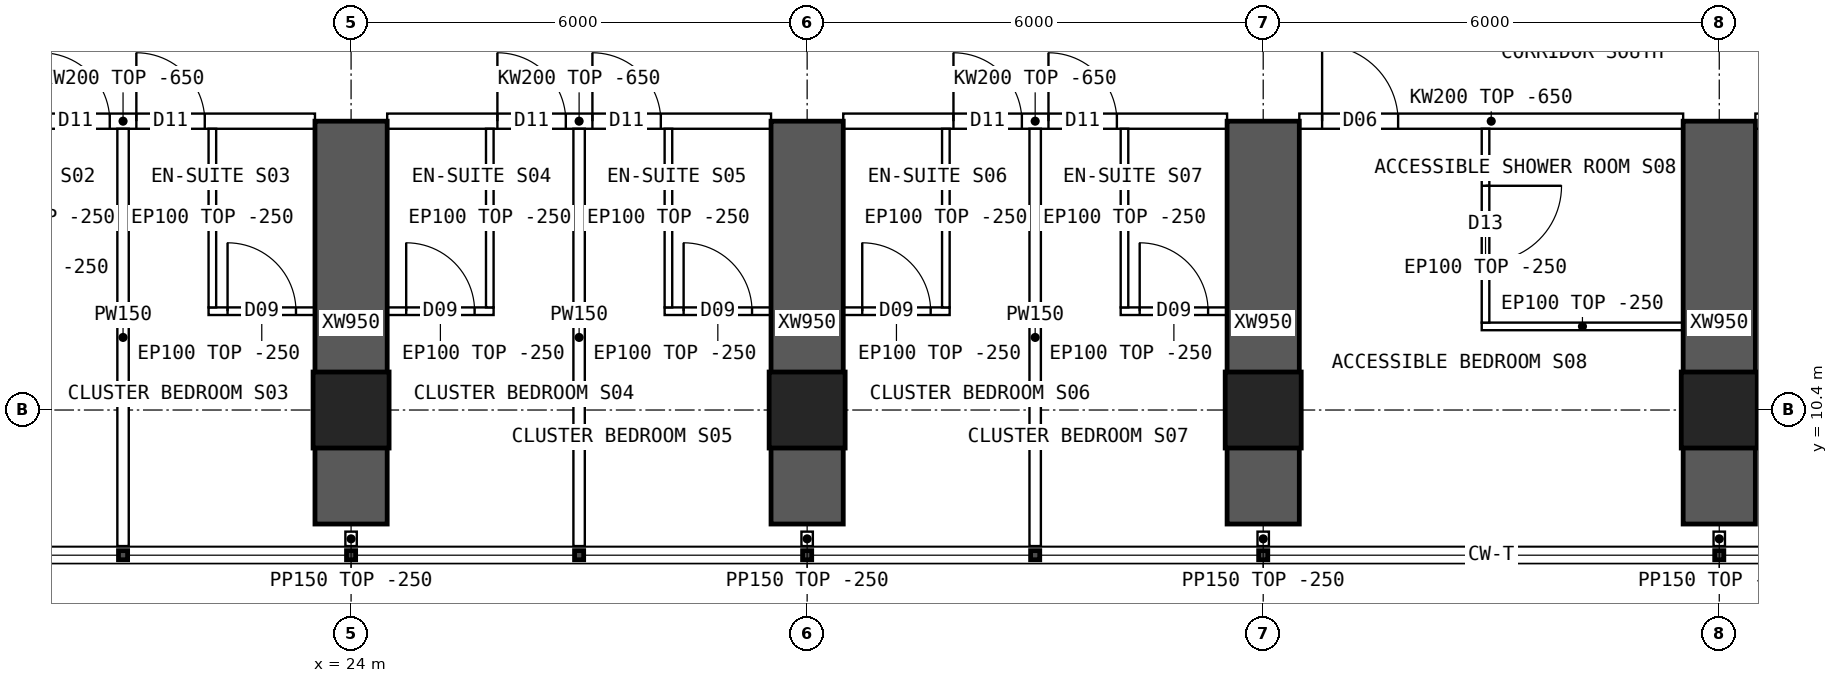
"""IFC4 building model, lengths in metres.
Left out: names, types, materials, properties, quantities, classifications, styles, units other than length and angle.
Written with IfcOpenShell. Run it as: python <this file> out.ifc"""

import sys

from ifc_helpers import new_model, si_unit, direction, frame, frame_2d, origin, origin_2d, place, context, subcontext, project, spatial, polyline, rectangle, hollow_rectangle, outline, extrude, element, fill, save


model = new_model("IFC4")
c1 = context("Model", 3, precision=1e-05, world=origin(), true_north=direction((0.0, 1.0)))
c2 = subcontext(c1, "Body", "Model", "MODEL_VIEW")
j1 = project(units=[si_unit("LENGTHUNIT", "METRE"), si_unit("PLANEANGLEUNIT", "RADIAN")], contexts=[c1])
p1 = place(None, origin())
s1 = spatial("IfcSite", under=j1, at=p1, CompositionType="ELEMENT")
p2 = place(p1, origin())
s2 = spatial("IfcBuilding", under=s1, at=p2, CompositionType="ELEMENT")
p3 = place(p2, frame((0.0, 0.0, 84.4)))
s3 = spatial("IfcBuildingStorey", under=s2, at=p3, CompositionType="ELEMENT", Elevation=84.4)
for number, where, z_axis, x_axis in (
    (1, (24.0, 10.4, 0.0), (0.0, 0.0, 1.0), (1.0, 0.0, 0.0)),
    (2, (30.0, 10.4, 0.0), (0.0, 0.0, 1.0), (1.0, 0.0, 0.0)),
    (3, (36.0, 10.4, 0.0), (0.0, 0.0, 1.0), (1.0, 0.0, 0.0)),
    (4, (42.0, 10.4, 0.0), (0.0, 0.0, 1.0), (1.0, 0.0, 0.0)),
):
    element("IfcColumn", number, at=place(p3, frame(where, z_axis=z_axis, x_axis=x_axis)), inside=s3, PredefinedType="COLUMN", context=c2, shape_type="SweptSolid", body=[
        extrude(hollow_rectangle(XDim=1.0, YDim=1.0, WallThickness=0.1, at=origin_2d()), origin(), (0.0, 0.0, 1.0), 3.75),
    ])
for number, where, z_axis, x_axis in (
    (5, (24.0, 8.9, 0.0), (0.0, 0.0, 1.0), (0.0, 1.0, 0.0)),
    (6, (30.0, 8.9, 0.0), (0.0, 0.0, 1.0), (0.0, 1.0, 0.0)),
    (7, (36.0, 8.9, 0.0), (0.0, 0.0, 1.0), (0.0, 1.0, 0.0)),
    (8, (42.0, 8.9, 0.0), (0.0, 0.0, 1.0), (0.0, 1.0, 0.0)),
):
    element("IfcWall", number, at=place(p3, frame(where, z_axis=z_axis, x_axis=x_axis)), inside=s3, PredefinedType="SHEAR", context=c2, shape_type="SweptSolid", body=[
        extrude(rectangle(XDim=5.3, YDim=0.95, at=frame_2d((2.65, 0.0))), origin(), (0.0, 0.0, 1.0), 3.75),
    ])
p4 = place(p3, frame((18.475, 14.2, 0.0), z_axis=(0.0, 0.0, 1.0), x_axis=(1.0, 0.0, 0.0)))
e9 = element("IfcWall", 9, at=p4, inside=s3, PredefinedType="SOLIDWALL", context=c2, shape_type="SweptSolid", body=[
    extrude(outline(polyline([(0.0, 0.0), (5.05, 0.0), (5.05, 3.1), (0.0, 3.1), (0.0, 0.0)])), frame((0.0, 0.1, 0.0), z_axis=(0.0, -1.0, 0.0), x_axis=(1.0, 0.0, 0.0)), (0.0, 0.0, 1.0), 0.2),
])
p5 = place(p4, frame((1.45, 0.0, 0.0)))
e10 = element("IfcOpeningElement", 10, at=p5, cuts=e9, PredefinedType="OPENING", context=c2, shape_type="SweptSolid", body=[
    extrude(rectangle(XDim=0.9, YDim=2.1, at=frame_2d((0.45, 1.05))), frame((0.0, 0.11, 0.0), z_axis=(0.0, -1.0, 0.0), x_axis=(1.0, 0.0, 0.0)), (0.0, 0.0, 1.0), 0.22),
])
p6 = place(p4, frame((2.7, 0.0, 0.0)))
e11 = element("IfcOpeningElement", 11, at=p6, cuts=e9, PredefinedType="OPENING", context=c2, shape_type="SweptSolid", body=[
    extrude(rectangle(XDim=0.9, YDim=2.1, at=frame_2d((0.45, 1.05))), frame((0.0, 0.11, 0.0), z_axis=(0.0, -1.0, 0.0), x_axis=(1.0, 0.0, 0.0)), (0.0, 0.0, 1.0), 0.22),
])
p7 = place(p3, frame((24.475, 14.2, 0.0), z_axis=(0.0, 0.0, 1.0), x_axis=(1.0, 0.0, 0.0)))
e12 = element("IfcWall", 12, at=p7, inside=s3, PredefinedType="SOLIDWALL", context=c2, shape_type="SweptSolid", body=[
    extrude(outline(polyline([(0.0, 0.0), (5.05, 0.0), (5.05, 3.1), (0.0, 3.1), (0.0, 0.0)])), frame((0.0, 0.1, 0.0), z_axis=(0.0, -1.0, 0.0), x_axis=(1.0, 0.0, 0.0)), (0.0, 0.0, 1.0), 0.2),
])
p8 = place(p7, frame((1.45, 0.0, 0.0)))
e13 = element("IfcOpeningElement", 13, at=p8, cuts=e12, PredefinedType="OPENING", context=c2, shape_type="SweptSolid", body=[
    extrude(rectangle(XDim=0.9, YDim=2.1, at=frame_2d((0.45, 1.05))), frame((0.0, 0.11, 0.0), z_axis=(0.0, -1.0, 0.0), x_axis=(1.0, 0.0, 0.0)), (0.0, 0.0, 1.0), 0.22),
])
p9 = place(p7, frame((2.7, 0.0, 0.0)))
e14 = element("IfcOpeningElement", 14, at=p9, cuts=e12, PredefinedType="OPENING", context=c2, shape_type="SweptSolid", body=[
    extrude(rectangle(XDim=0.9, YDim=2.1, at=frame_2d((0.45, 1.05))), frame((0.0, 0.11, 0.0), z_axis=(0.0, -1.0, 0.0), x_axis=(1.0, 0.0, 0.0)), (0.0, 0.0, 1.0), 0.22),
])
p10 = place(p3, frame((30.475, 14.2, 0.0), z_axis=(0.0, 0.0, 1.0), x_axis=(1.0, 0.0, 0.0)))
e15 = element("IfcWall", 15, at=p10, inside=s3, PredefinedType="SOLIDWALL", context=c2, shape_type="SweptSolid", body=[
    extrude(outline(polyline([(0.0, 0.0), (5.05, 0.0), (5.05, 3.1), (0.0, 3.1), (0.0, 0.0)])), frame((0.0, 0.1, 0.0), z_axis=(0.0, -1.0, 0.0), x_axis=(1.0, 0.0, 0.0)), (0.0, 0.0, 1.0), 0.2),
])
p11 = place(p10, frame((1.45, 0.0, 0.0)))
e16 = element("IfcOpeningElement", 16, at=p11, cuts=e15, PredefinedType="OPENING", context=c2, shape_type="SweptSolid", body=[
    extrude(rectangle(XDim=0.9, YDim=2.1, at=frame_2d((0.45, 1.05))), frame((0.0, 0.11, 0.0), z_axis=(0.0, -1.0, 0.0), x_axis=(1.0, 0.0, 0.0)), (0.0, 0.0, 1.0), 0.22),
])
p12 = place(p10, frame((2.7, 0.0, 0.0)))
e17 = element("IfcOpeningElement", 17, at=p12, cuts=e15, PredefinedType="OPENING", context=c2, shape_type="SweptSolid", body=[
    extrude(rectangle(XDim=0.9, YDim=2.1, at=frame_2d((0.45, 1.05))), frame((0.0, 0.11, 0.0), z_axis=(0.0, -1.0, 0.0), x_axis=(1.0, 0.0, 0.0)), (0.0, 0.0, 1.0), 0.22),
])
p13 = place(p3, frame((36.475, 14.2, 0.0), z_axis=(0.0, 0.0, 1.0), x_axis=(1.0, 0.0, 0.0)))
e18 = element("IfcWall", 18, at=p13, inside=s3, PredefinedType="SOLIDWALL", context=c2, shape_type="SweptSolid", body=[
    extrude(outline(polyline([(0.0, 0.0), (5.05, 0.0), (5.05, 3.1), (0.0, 3.1), (0.0, 0.0)])), frame((0.0, 0.1, 0.0), z_axis=(0.0, -1.0, 0.0), x_axis=(1.0, 0.0, 0.0)), (0.0, 0.0, 1.0), 0.2),
])
p14 = place(p13, frame((0.3, 0.0, 0.0)))
e19 = element("IfcOpeningElement", 19, at=p14, cuts=e18, PredefinedType="OPENING", context=c2, shape_type="SweptSolid", body=[
    extrude(rectangle(XDim=1.0, YDim=2.1, at=frame_2d((0.5, 1.05))), frame((0.0, 0.11, 0.0), z_axis=(0.0, -1.0, 0.0), x_axis=(1.0, 0.0, 0.0)), (0.0, 0.0, 1.0), 0.22),
])
p15 = place(p3, frame((42.475, 14.2, 0.0), z_axis=(0.0, 0.0, 1.0), x_axis=(1.0, 0.0, 0.0)))
e20 = element("IfcWall", 20, at=p15, inside=s3, PredefinedType="SOLIDWALL", context=c2, shape_type="SweptSolid", body=[
    extrude(outline(polyline([(0.0, 0.0), (5.05, 0.0), (5.05, 3.1), (0.0, 3.1), (0.0, 0.0)])), frame((0.0, 0.1, 0.0), z_axis=(0.0, -1.0, 0.0), x_axis=(1.0, 0.0, 0.0)), (0.0, 0.0, 1.0), 0.2),
])
p16 = place(p15, frame((0.6, 0.0, 0.0)))
e21 = element("IfcOpeningElement", 21, at=p16, cuts=e20, PredefinedType="OPENING", context=c2, shape_type="SweptSolid", body=[
    extrude(rectangle(XDim=1.0, YDim=2.1, at=frame_2d((0.5, 1.05))), frame((0.0, 0.11, 0.0), z_axis=(0.0, -1.0, 0.0), x_axis=(1.0, 0.0, 0.0)), (0.0, 0.0, 1.0), 0.22),
])
p17 = place(p3, frame((21.0, 8.61, 0.0), z_axis=(0.0, 0.0, 1.0), x_axis=(0.0, 1.0, 0.0)))
e22 = element("IfcWall", 22, at=p17, inside=s3, PredefinedType="PARTITIONING", context=c2, shape_type="SweptSolid", body=[
    extrude(outline(polyline([(0.0, 0.0), (5.49, 0.0), (5.49, 3.1), (5.442, 3.1), (5.44, 3.5), (1.992, 3.5), (1.99, 3.1), (1.592, 3.1), (1.59, 3.5), (0.0, 3.5), (0.0, 0.0)])), frame((0.0, 0.075, 0.0), z_axis=(0.0, -1.0, 0.0), x_axis=(1.0, 0.0, 0.0)), (0.0, 0.0, 1.0), 0.15),
])
p18 = place(p3, frame((23.525, 11.7, 0.0), z_axis=(0.0, 0.0, 1.0), x_axis=(-1.0, 0.0, 0.0)))
e23 = element("IfcWall", 23, at=p18, inside=s3, PredefinedType="PARTITIONING", context=c2, shape_type="SweptSolid", body=[
    extrude(rectangle(XDim=1.4, YDim=0.1, at=frame_2d((0.7, 0.0))), origin(), (0.0, 0.0, 1.0), 3.5),
])
p19 = place(p18, frame((0.25, 0.0, 0.0)))
e24 = element("IfcOpeningElement", 24, at=p19, cuts=e23, PredefinedType="OPENING", context=c2, shape_type="SweptSolid", body=[
    extrude(rectangle(XDim=0.9, YDim=2.1, at=frame_2d((0.45, 1.05))), frame((0.0, 0.06, 0.0), z_axis=(0.0, -1.0, 0.0), x_axis=(1.0, 0.0, 0.0)), (0.0, 0.0, 1.0), 0.12),
])
p20 = place(p3, frame((22.175, 11.75, 0.0), z_axis=(0.0, 0.0, 1.0), x_axis=(0.0, 1.0, 0.0)))
e25 = element("IfcWall", 25, at=p20, inside=s3, PredefinedType="PARTITIONING", context=c2, shape_type="SweptSolid", body=[
    extrude(outline(polyline([(0.0, 0.0), (2.35, 0.0), (2.35, 3.1), (2.302, 3.1), (2.3, 3.5), (0.0, 3.5), (0.0, 0.0)])), frame((0.0, 0.05, 0.0), z_axis=(0.0, -1.0, 0.0), x_axis=(1.0, 0.0, 0.0)), (0.0, 0.0, 1.0), 0.1),
])
p21 = place(p3, frame((27.0, 8.61, 0.0), z_axis=(0.0, 0.0, 1.0), x_axis=(0.0, 1.0, 0.0)))
e26 = element("IfcWall", 26, at=p21, inside=s3, PredefinedType="PARTITIONING", context=c2, shape_type="SweptSolid", body=[
    extrude(outline(polyline([(0.0, 0.0), (5.49, 0.0), (5.49, 3.1), (5.442, 3.1), (5.44, 3.5), (1.992, 3.5), (1.99, 3.1), (1.592, 3.1), (1.59, 3.5), (0.0, 3.5), (0.0, 0.0)])), frame((0.0, 0.075, 0.0), z_axis=(0.0, -1.0, 0.0), x_axis=(1.0, 0.0, 0.0)), (0.0, 0.0, 1.0), 0.15),
])
p22 = place(p3, frame((25.875, 11.7, 0.0), z_axis=(0.0, 0.0, 1.0), x_axis=(-1.0, 0.0, 0.0)))
e27 = element("IfcWall", 27, at=p22, inside=s3, PredefinedType="PARTITIONING", context=c2, shape_type="SweptSolid", body=[
    extrude(rectangle(XDim=1.4, YDim=0.1, at=frame_2d((0.7, 0.0))), origin(), (0.0, 0.0, 1.0), 3.5),
])
p23 = place(p22, frame((0.25, 0.0, 0.0)))
e28 = element("IfcOpeningElement", 28, at=p23, cuts=e27, PredefinedType="OPENING", context=c2, shape_type="SweptSolid", body=[
    extrude(rectangle(XDim=0.9, YDim=2.1, at=frame_2d((0.45, 1.05))), frame((0.0, 0.06, 0.0), z_axis=(0.0, -1.0, 0.0), x_axis=(1.0, 0.0, 0.0)), (0.0, 0.0, 1.0), 0.12),
])
p24 = place(p3, frame((25.825, 11.75, 0.0), z_axis=(0.0, 0.0, 1.0), x_axis=(0.0, 1.0, 0.0)))
e29 = element("IfcWall", 29, at=p24, inside=s3, PredefinedType="PARTITIONING", context=c2, shape_type="SweptSolid", body=[
    extrude(outline(polyline([(0.0, 0.0), (2.35, 0.0), (2.35, 3.1), (2.302, 3.1), (2.3, 3.5), (0.0, 3.5), (0.0, 0.0)])), frame((0.0, 0.05, 0.0), z_axis=(0.0, -1.0, 0.0), x_axis=(1.0, 0.0, 0.0)), (0.0, 0.0, 1.0), 0.1),
])
p25 = place(p3, frame((29.525, 11.7, 0.0), z_axis=(0.0, 0.0, 1.0), x_axis=(-1.0, 0.0, 0.0)))
e30 = element("IfcWall", 30, at=p25, inside=s3, PredefinedType="PARTITIONING", context=c2, shape_type="SweptSolid", body=[
    extrude(rectangle(XDim=1.4, YDim=0.1, at=frame_2d((0.7, 0.0))), origin(), (0.0, 0.0, 1.0), 3.5),
])
p26 = place(p25, frame((0.25, 0.0, 0.0)))
e31 = element("IfcOpeningElement", 31, at=p26, cuts=e30, PredefinedType="OPENING", context=c2, shape_type="SweptSolid", body=[
    extrude(rectangle(XDim=0.9, YDim=2.1, at=frame_2d((0.45, 1.05))), frame((0.0, 0.06, 0.0), z_axis=(0.0, -1.0, 0.0), x_axis=(1.0, 0.0, 0.0)), (0.0, 0.0, 1.0), 0.12),
])
p27 = place(p3, frame((28.175, 11.75, 0.0), z_axis=(0.0, 0.0, 1.0), x_axis=(0.0, 1.0, 0.0)))
e32 = element("IfcWall", 32, at=p27, inside=s3, PredefinedType="PARTITIONING", context=c2, shape_type="SweptSolid", body=[
    extrude(outline(polyline([(0.0, 0.0), (2.35, 0.0), (2.35, 3.1), (2.302, 3.1), (2.3, 3.5), (0.0, 3.5), (0.0, 0.0)])), frame((0.0, 0.05, 0.0), z_axis=(0.0, -1.0, 0.0), x_axis=(1.0, 0.0, 0.0)), (0.0, 0.0, 1.0), 0.1),
])
p28 = place(p3, frame((33.0, 8.61, 0.0), z_axis=(0.0, 0.0, 1.0), x_axis=(0.0, 1.0, 0.0)))
e33 = element("IfcWall", 33, at=p28, inside=s3, PredefinedType="PARTITIONING", context=c2, shape_type="SweptSolid", body=[
    extrude(outline(polyline([(0.0, 0.0), (5.49, 0.0), (5.49, 3.1), (5.442, 3.1), (5.44, 3.5), (1.992, 3.5), (1.99, 3.1), (1.592, 3.1), (1.59, 3.5), (0.0, 3.5), (0.0, 0.0)])), frame((0.0, 0.075, 0.0), z_axis=(0.0, -1.0, 0.0), x_axis=(1.0, 0.0, 0.0)), (0.0, 0.0, 1.0), 0.15),
])
p29 = place(p3, frame((31.875, 11.7, 0.0), z_axis=(0.0, 0.0, 1.0), x_axis=(-1.0, 0.0, 0.0)))
e34 = element("IfcWall", 34, at=p29, inside=s3, PredefinedType="PARTITIONING", context=c2, shape_type="SweptSolid", body=[
    extrude(rectangle(XDim=1.4, YDim=0.1, at=frame_2d((0.7, 0.0))), origin(), (0.0, 0.0, 1.0), 3.5),
])
p30 = place(p29, frame((0.25, 0.0, 0.0)))
e35 = element("IfcOpeningElement", 35, at=p30, cuts=e34, PredefinedType="OPENING", context=c2, shape_type="SweptSolid", body=[
    extrude(rectangle(XDim=0.9, YDim=2.1, at=frame_2d((0.45, 1.05))), frame((0.0, 0.06, 0.0), z_axis=(0.0, -1.0, 0.0), x_axis=(1.0, 0.0, 0.0)), (0.0, 0.0, 1.0), 0.12),
])
p31 = place(p3, frame((31.825, 11.75, 0.0), z_axis=(0.0, 0.0, 1.0), x_axis=(0.0, 1.0, 0.0)))
e36 = element("IfcWall", 36, at=p31, inside=s3, PredefinedType="PARTITIONING", context=c2, shape_type="SweptSolid", body=[
    extrude(outline(polyline([(0.0, 0.0), (2.35, 0.0), (2.35, 3.1), (2.302, 3.1), (2.3, 3.5), (0.0, 3.5), (0.0, 0.0)])), frame((0.0, 0.05, 0.0), z_axis=(0.0, -1.0, 0.0), x_axis=(1.0, 0.0, 0.0)), (0.0, 0.0, 1.0), 0.1),
])
p32 = place(p3, frame((35.525, 11.7, 0.0), z_axis=(0.0, 0.0, 1.0), x_axis=(-1.0, 0.0, 0.0)))
e37 = element("IfcWall", 37, at=p32, inside=s3, PredefinedType="PARTITIONING", context=c2, shape_type="SweptSolid", body=[
    extrude(rectangle(XDim=1.4, YDim=0.1, at=frame_2d((0.7, 0.0))), origin(), (0.0, 0.0, 1.0), 3.5),
])
p33 = place(p32, frame((0.25, 0.0, 0.0)))
e38 = element("IfcOpeningElement", 38, at=p33, cuts=e37, PredefinedType="OPENING", context=c2, shape_type="SweptSolid", body=[
    extrude(rectangle(XDim=0.9, YDim=2.1, at=frame_2d((0.45, 1.05))), frame((0.0, 0.06, 0.0), z_axis=(0.0, -1.0, 0.0), x_axis=(1.0, 0.0, 0.0)), (0.0, 0.0, 1.0), 0.12),
])
p34 = place(p3, frame((34.175, 11.75, 0.0), z_axis=(0.0, 0.0, 1.0), x_axis=(0.0, 1.0, 0.0)))
e39 = element("IfcWall", 39, at=p34, inside=s3, PredefinedType="PARTITIONING", context=c2, shape_type="SweptSolid", body=[
    extrude(outline(polyline([(0.0, 0.0), (2.35, 0.0), (2.35, 3.1), (2.302, 3.1), (2.3, 3.5), (0.0, 3.5), (0.0, 0.0)])), frame((0.0, 0.05, 0.0), z_axis=(0.0, -1.0, 0.0), x_axis=(1.0, 0.0, 0.0)), (0.0, 0.0, 1.0), 0.1),
])
p35 = place(p3, frame((38.875, 11.5, 0.0), z_axis=(0.0, 0.0, 1.0), x_axis=(1.0, 0.0, 0.0)))
e40 = element("IfcWall", 40, at=p35, inside=s3, PredefinedType="PARTITIONING", context=c2, shape_type="SweptSolid", body=[
    extrude(rectangle(XDim=2.65, YDim=0.1, at=frame_2d((1.325, 0.0))), origin(), (0.0, 0.0, 1.0), 3.5),
])
p36 = place(p3, frame((38.925, 11.55, 0.0), z_axis=(0.0, 0.0, 1.0), x_axis=(0.0, 1.0, 0.0)))
e41 = element("IfcWall", 41, at=p36, inside=s3, PredefinedType="PARTITIONING", context=c2, shape_type="SweptSolid", body=[
    extrude(outline(polyline([(0.0, 0.0), (2.55, 0.0), (2.55, 3.1), (2.502, 3.1), (2.5, 3.5), (0.0, 3.5), (0.0, 0.0)])), frame((0.0, 0.05, 0.0), z_axis=(0.0, -1.0, 0.0), x_axis=(1.0, 0.0, 0.0)), (0.0, 0.0, 1.0), 0.1),
])
p37 = place(p36, frame((0.8, 0.0, 0.0)))
e42 = element("IfcOpeningElement", 42, at=p37, cuts=e41, PredefinedType="OPENING", context=c2, shape_type="SweptSolid", body=[
    extrude(rectangle(XDim=1.0, YDim=2.1, at=frame_2d((0.5, 1.05))), frame((0.0, 0.06, 0.0), z_axis=(0.0, -1.0, 0.0), x_axis=(1.0, 0.0, 0.0)), (0.0, 0.0, 1.0), 0.12),
])
for number, where, z_axis, x_axis in (
    (43, (24.0, 8.8, 0.0), (0.0, 0.0, 1.0), (0.0, -1.0, 0.0)),
    (44, (30.0, 8.8, 0.0), (0.0, 0.0, 1.0), (0.0, -1.0, 0.0)),
    (45, (36.0, 8.8, 0.0), (0.0, 0.0, 1.0), (0.0, -1.0, 0.0)),
    (46, (42.0, 8.8, 0.0), (0.0, 0.0, 1.0), (0.0, -1.0, 0.0)),
):
    element("IfcWall", number, at=place(p3, frame(where, z_axis=z_axis, x_axis=x_axis)), inside=s3, PredefinedType="PARTITIONING", context=c2, shape_type="SweptSolid", body=[
        extrude(rectangle(XDim=0.19, YDim=0.15, at=frame_2d((0.095, 0.0))), origin(), (0.0, 0.0, 1.0), 3.5),
    ])
p38 = place(p5, origin())
e47 = element("IfcDoor", 47, at=p38, inside=s3, OperationType="SINGLE_SWING_LEFT", PredefinedType="DOOR", context=c2, shape_type="SweptSolid", body=[
    extrude(rectangle(XDim=0.9, YDim=2.1, at=frame_2d((0.45, 1.05))), frame((0.0, 0.025, 0.0), z_axis=(0.0, -1.0, 0.0), x_axis=(1.0, 0.0, 0.0)), (0.0, 0.0, 1.0), 0.05),
])
fill(e10, e47)
p39 = place(p19, origin())
e48 = element("IfcDoor", 48, at=p39, inside=s3, OperationType="SINGLE_SWING_RIGHT", PredefinedType="DOOR", context=c2, shape_type="SweptSolid", body=[
    extrude(rectangle(XDim=0.9, YDim=2.1, at=frame_2d((0.45, 1.05))), frame((0.0, 0.025, 0.0), z_axis=(0.0, -1.0, 0.0), x_axis=(1.0, 0.0, 0.0)), (0.0, 0.0, 1.0), 0.05),
])
fill(e24, e48)
p40 = place(p6, origin())
e49 = element("IfcDoor", 49, at=p40, inside=s3, OperationType="SINGLE_SWING_LEFT", PredefinedType="DOOR", context=c2, shape_type="SweptSolid", body=[
    extrude(rectangle(XDim=0.9, YDim=2.1, at=frame_2d((0.45, 1.05))), frame((0.0, 0.025, 0.0), z_axis=(0.0, -1.0, 0.0), x_axis=(1.0, 0.0, 0.0)), (0.0, 0.0, 1.0), 0.05),
])
fill(e11, e49)
p41 = place(p23, origin())
e50 = element("IfcDoor", 50, at=p41, inside=s3, OperationType="SINGLE_SWING_RIGHT", PredefinedType="DOOR", context=c2, shape_type="SweptSolid", body=[
    extrude(rectangle(XDim=0.9, YDim=2.1, at=frame_2d((0.45, 1.05))), frame((0.0, 0.025, 0.0), z_axis=(0.0, -1.0, 0.0), x_axis=(1.0, 0.0, 0.0)), (0.0, 0.0, 1.0), 0.05),
])
fill(e28, e50)
p42 = place(p8, origin())
e51 = element("IfcDoor", 51, at=p42, inside=s3, OperationType="SINGLE_SWING_LEFT", PredefinedType="DOOR", context=c2, shape_type="SweptSolid", body=[
    extrude(rectangle(XDim=0.9, YDim=2.1, at=frame_2d((0.45, 1.05))), frame((0.0, 0.025, 0.0), z_axis=(0.0, -1.0, 0.0), x_axis=(1.0, 0.0, 0.0)), (0.0, 0.0, 1.0), 0.05),
])
fill(e13, e51)
p43 = place(p26, origin())
e52 = element("IfcDoor", 52, at=p43, inside=s3, OperationType="SINGLE_SWING_RIGHT", PredefinedType="DOOR", context=c2, shape_type="SweptSolid", body=[
    extrude(rectangle(XDim=0.9, YDim=2.1, at=frame_2d((0.45, 1.05))), frame((0.0, 0.025, 0.0), z_axis=(0.0, -1.0, 0.0), x_axis=(1.0, 0.0, 0.0)), (0.0, 0.0, 1.0), 0.05),
])
fill(e31, e52)
p44 = place(p9, origin())
e53 = element("IfcDoor", 53, at=p44, inside=s3, OperationType="SINGLE_SWING_LEFT", PredefinedType="DOOR", context=c2, shape_type="SweptSolid", body=[
    extrude(rectangle(XDim=0.9, YDim=2.1, at=frame_2d((0.45, 1.05))), frame((0.0, 0.025, 0.0), z_axis=(0.0, -1.0, 0.0), x_axis=(1.0, 0.0, 0.0)), (0.0, 0.0, 1.0), 0.05),
])
fill(e14, e53)
p45 = place(p30, origin())
e54 = element("IfcDoor", 54, at=p45, inside=s3, OperationType="SINGLE_SWING_RIGHT", PredefinedType="DOOR", context=c2, shape_type="SweptSolid", body=[
    extrude(rectangle(XDim=0.9, YDim=2.1, at=frame_2d((0.45, 1.05))), frame((0.0, 0.025, 0.0), z_axis=(0.0, -1.0, 0.0), x_axis=(1.0, 0.0, 0.0)), (0.0, 0.0, 1.0), 0.05),
])
fill(e35, e54)
p46 = place(p11, origin())
e55 = element("IfcDoor", 55, at=p46, inside=s3, OperationType="SINGLE_SWING_LEFT", PredefinedType="DOOR", context=c2, shape_type="SweptSolid", body=[
    extrude(rectangle(XDim=0.9, YDim=2.1, at=frame_2d((0.45, 1.05))), frame((0.0, 0.025, 0.0), z_axis=(0.0, -1.0, 0.0), x_axis=(1.0, 0.0, 0.0)), (0.0, 0.0, 1.0), 0.05),
])
fill(e16, e55)
p47 = place(p33, origin())
e56 = element("IfcDoor", 56, at=p47, inside=s3, OperationType="SINGLE_SWING_RIGHT", PredefinedType="DOOR", context=c2, shape_type="SweptSolid", body=[
    extrude(rectangle(XDim=0.9, YDim=2.1, at=frame_2d((0.45, 1.05))), frame((0.0, 0.025, 0.0), z_axis=(0.0, -1.0, 0.0), x_axis=(1.0, 0.0, 0.0)), (0.0, 0.0, 1.0), 0.05),
])
fill(e38, e56)
p48 = place(p12, origin())
e57 = element("IfcDoor", 57, at=p48, inside=s3, OperationType="SINGLE_SWING_LEFT", PredefinedType="DOOR", context=c2, shape_type="SweptSolid", body=[
    extrude(rectangle(XDim=0.9, YDim=2.1, at=frame_2d((0.45, 1.05))), frame((0.0, 0.025, 0.0), z_axis=(0.0, -1.0, 0.0), x_axis=(1.0, 0.0, 0.0)), (0.0, 0.0, 1.0), 0.05),
])
fill(e17, e57)
p49 = place(p37, origin())
e58 = element("IfcDoor", 58, at=p49, inside=s3, OperationType="SINGLE_SWING_RIGHT", PredefinedType="DOOR", context=c2, shape_type="SweptSolid", body=[
    extrude(rectangle(XDim=1.0, YDim=2.1, at=frame_2d((0.5, 1.05))), frame((0.0, 0.025, 0.0), z_axis=(0.0, -1.0, 0.0), x_axis=(1.0, 0.0, 0.0)), (0.0, 0.0, 1.0), 0.05),
])
fill(e42, e58)
p50 = place(p14, origin())
e59 = element("IfcDoor", 59, at=p50, inside=s3, OperationType="SINGLE_SWING_LEFT", PredefinedType="DOOR", context=c2, shape_type="SweptSolid", body=[
    extrude(rectangle(XDim=1.0, YDim=2.1, at=frame_2d((0.5, 1.05))), frame((0.0, 0.025, 0.0), z_axis=(0.0, -1.0, 0.0), x_axis=(1.0, 0.0, 0.0)), (0.0, 0.0, 1.0), 0.05),
])
fill(e19, e59)
save(model, sys.argv[1])
